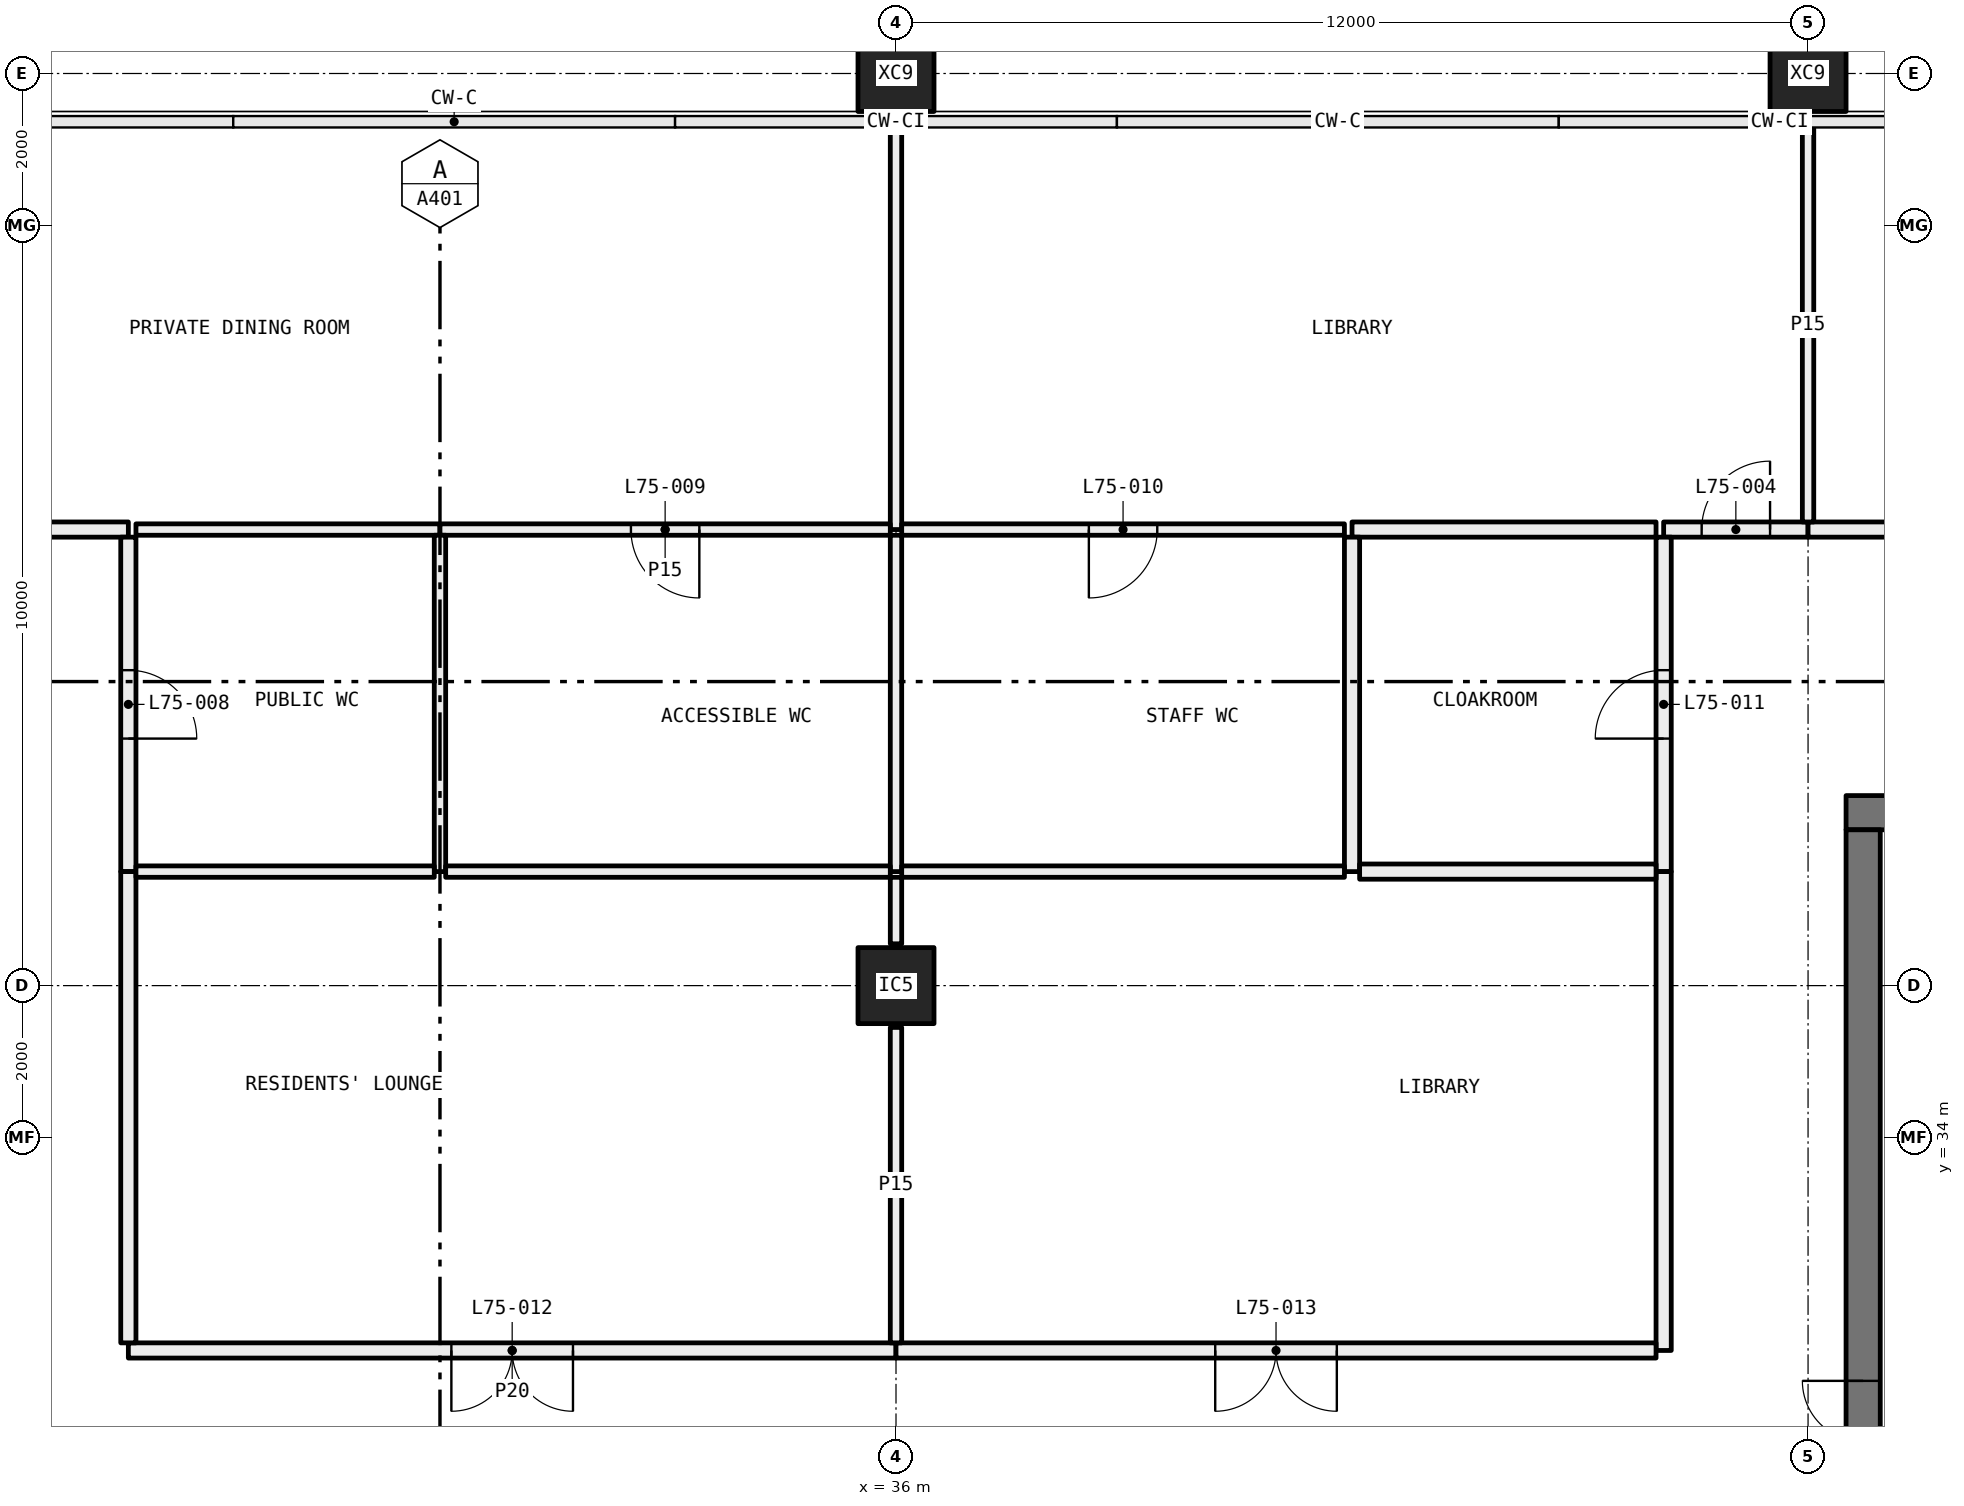
"""IFC4 building model, lengths in metres.
Left out: names, types, materials, properties, quantities, classifications, styles, units other than length and angle.
Written with IfcOpenShell. Run it as: python <this file> out.ifc"""

import sys

from ifc_helpers import new_model, si_unit, direction, frame, frame_2d, origin, origin_2d, place, context, subcontext, project, spatial, rectangle, hollow_rectangle, extrude, element, fill, save


model = new_model("IFC4")
c1 = context("Model", 3, precision=1e-05, world=origin(), true_north=direction((0.0, 1.0)))
c2 = subcontext(c1, "Body", "Model", "MODEL_VIEW")
j1 = project(units=[si_unit("LENGTHUNIT", "METRE"), si_unit("PLANEANGLEUNIT", "RADIAN")], contexts=[c1])
p1 = place(None, origin())
s1 = spatial("IfcSite", under=j1, at=p1, CompositionType="ELEMENT")
p2 = place(p1, origin())
s2 = spatial("IfcBuilding", under=s1, at=p2, CompositionType="ELEMENT")
p3 = place(p2, frame((0.0, 0.0, 277.95)))
s3 = spatial("IfcBuildingStorey", under=s2, at=p3, CompositionType="ELEMENT", Elevation=277.95)
p4 = place(p3, frame((36.0, 36.0, 0.0), z_axis=(0.0, 0.0, 1.0), x_axis=(1.0, 0.0, 0.0)))
e1 = element("IfcColumn", 1, at=p4, inside=s3, PredefinedType="COLUMN", context=c2, shape_type="SweptSolid", body=[
    extrude(hollow_rectangle(XDim=1.0, YDim=1.0, WallThickness=0.04, at=origin_2d()), origin(), (0.0, 0.0, 1.0), 5.0),
])
for number, where, z_axis, x_axis in (
    (2, (36.0, 48.0, -0.4), (0.0, 0.0, 1.0), (1.0, 0.0, 0.0)),
    (3, (48.0, 48.0, -0.4), (0.0, 0.0, 1.0), (1.0, 0.0, 0.0)),
):
    element("IfcColumn", number, at=place(p3, frame(where, z_axis=z_axis, x_axis=x_axis)), inside=s3, PredefinedType="COLUMN", context=c2, shape_type="SweptSolid", body=[
        extrude(hollow_rectangle(XDim=1.0, YDim=1.0, WallThickness=0.036, at=origin_2d()), origin(), (0.0, 0.0, 1.0), 5.4),
    ])
p5 = place(p3, frame((25.9, 42.0, 0.0), z_axis=(0.0, 0.0, 1.0), x_axis=(-1.0, 0.0, 0.0)))
e4 = element("IfcWall", 4, at=p5, inside=s3, PredefinedType="PARTITIONING", context=c2, shape_type="SweptSolid", body=[
    extrude(rectangle(XDim=7.18, YDim=0.2, at=frame_2d((3.59, 0.0))), origin(), (0.0, 0.0, 1.0), 5.0),
])
p6 = place(p5, frame((2.79, 0.0, 0.0)))
e5 = element("IfcOpeningElement", 5, at=p6, cuts=e4, PredefinedType="OPENING", context=c2, shape_type="SweptSolid", body=[
    extrude(rectangle(XDim=1.6, YDim=2.1, at=frame_2d((0.8, 1.05))), frame((0.0, 0.11, 0.0), z_axis=(0.0, -1.0, 0.0), x_axis=(1.0, 0.0, 0.0)), (0.0, 0.0, 1.0), 0.22),
])
p7 = place(p3, frame((48.0, 42.0, 0.0), z_axis=(0.0, 0.0, 1.0), x_axis=(-1.0, 0.0, 0.0)))
e6 = element("IfcWall", 6, at=p7, inside=s3, PredefinedType="PARTITIONING", context=c2, shape_type="SweptSolid", body=[
    extrude(rectangle(XDim=1.9, YDim=0.2, at=frame_2d((0.95, 0.0))), origin(), (0.0, 0.0, 1.0), 5.0),
])
p8 = place(p7, frame((0.5, 0.0, 0.0)))
e7 = element("IfcOpeningElement", 7, at=p8, cuts=e6, PredefinedType="OPENING", context=c2, shape_type="SweptSolid", body=[
    extrude(rectangle(XDim=0.9, YDim=2.1, at=frame_2d((0.45, 1.05))), frame((0.0, 0.11, 0.0), z_axis=(0.0, -1.0, 0.0), x_axis=(1.0, 0.0, 0.0)), (0.0, 0.0, 1.0), 0.22),
])
p9 = place(p3, frame((53.28, 42.0, 0.0), z_axis=(0.0, 0.0, 1.0), x_axis=(-1.0, 0.0, 0.0)))
e8 = element("IfcWall", 8, at=p9, inside=s3, PredefinedType="PARTITIONING", context=c2, shape_type="SweptSolid", body=[
    extrude(rectangle(XDim=5.28, YDim=0.2, at=frame_2d((2.64, 0.0))), origin(), (0.0, 0.0, 1.0), 5.0),
])
p10 = place(p9, frame((2.19, 0.0, 0.0)))
e9 = element("IfcOpeningElement", 9, at=p10, cuts=e8, PredefinedType="OPENING", context=c2, shape_type="SweptSolid", body=[
    extrude(rectangle(XDim=0.9, YDim=2.1, at=frame_2d((0.45, 1.05))), frame((0.0, 0.11, 0.0), z_axis=(0.0, -1.0, 0.0), x_axis=(1.0, 0.0, 0.0)), (0.0, 0.0, 1.0), 0.22),
])
p11 = place(p3, frame((25.9, 37.5, 0.0), z_axis=(0.0, 0.0, 1.0), x_axis=(0.0, 1.0, 0.0)))
e10 = element("IfcWall", 10, at=p11, inside=s3, PredefinedType="PARTITIONING", context=c2, shape_type="SweptSolid", body=[
    extrude(rectangle(XDim=4.4, YDim=0.2, at=frame_2d((2.2, 0.0))), origin(), (0.0, 0.0, 1.0), 5.0),
])
p12 = place(p11, frame((1.75, 0.0, 0.0)))
e11 = element("IfcOpeningElement", 11, at=p12, cuts=e10, PredefinedType="OPENING", context=c2, shape_type="SweptSolid", body=[
    extrude(rectangle(XDim=0.9, YDim=2.1, at=frame_2d((0.45, 1.05))), frame((0.0, 0.11, 0.0), z_axis=(0.0, -1.0, 0.0), x_axis=(1.0, 0.0, 0.0)), (0.0, 0.0, 1.0), 0.22),
])
p13 = place(p3, frame((46.1, 41.9, 0.0), z_axis=(0.0, 0.0, 1.0), x_axis=(0.0, -1.0, 0.0)))
e12 = element("IfcWall", 12, at=p13, inside=s3, PredefinedType="PARTITIONING", context=c2, shape_type="SweptSolid", body=[
    extrude(rectangle(XDim=4.4, YDim=0.2, at=frame_2d((2.2, 0.0))), origin(), (0.0, 0.0, 1.0), 5.0),
])
p14 = place(p13, frame((1.75, 0.0, 0.0)))
e13 = element("IfcOpeningElement", 13, at=p14, cuts=e12, PredefinedType="OPENING", context=c2, shape_type="SweptSolid", body=[
    extrude(rectangle(XDim=0.9, YDim=2.1, at=frame_2d((0.45, 1.05))), frame((0.0, 0.11, 0.0), z_axis=(0.0, -1.0, 0.0), x_axis=(1.0, 0.0, 0.0)), (0.0, 0.0, 1.0), 0.22),
])
p15 = place(p3, frame((36.0, 31.2, 0.0), z_axis=(0.0, 0.0, 1.0), x_axis=(-1.0, 0.0, 0.0)))
e14 = element("IfcWall", 14, at=p15, inside=s3, PredefinedType="PARTITIONING", context=c2, shape_type="SweptSolid", body=[
    extrude(rectangle(XDim=10.1, YDim=0.2, at=frame_2d((5.05, 0.0))), origin(), (0.0, 0.0, 1.0), 4.4),
])
p16 = place(p15, frame((4.25, 0.0, 0.0)))
e15 = element("IfcOpeningElement", 15, at=p16, cuts=e14, PredefinedType="OPENING", context=c2, shape_type="SweptSolid", body=[
    extrude(rectangle(XDim=1.6, YDim=2.1, at=frame_2d((0.8, 1.05))), frame((0.0, 0.11, 0.0), z_axis=(0.0, -1.0, 0.0), x_axis=(1.0, 0.0, 0.0)), (0.0, 0.0, 1.0), 0.22),
])
p17 = place(p3, frame((25.9, 31.3, 0.0), z_axis=(0.0, 0.0, 1.0), x_axis=(0.0, 1.0, 0.0)))
e16 = element("IfcWall", 16, at=p17, inside=s3, PredefinedType="PARTITIONING", context=c2, shape_type="SweptSolid", body=[
    extrude(rectangle(XDim=6.2, YDim=0.2, at=frame_2d((3.1, 0.0))), origin(), (0.0, 0.0, 1.0), 5.0),
])
p18 = place(p3, frame((46.1, 37.5, 0.0), z_axis=(0.0, 0.0, 1.0), x_axis=(0.0, -1.0, 0.0)))
e17 = element("IfcWall", 17, at=p18, inside=s3, PredefinedType="PARTITIONING", context=c2, shape_type="SweptSolid", body=[
    extrude(rectangle(XDim=6.3, YDim=0.2, at=frame_2d((3.15, 0.0))), origin(), (0.0, 0.0, 1.0), 5.0),
])
p19 = place(p3, frame((46.0, 31.2, 0.0), z_axis=(0.0, 0.0, 1.0), x_axis=(-1.0, 0.0, 0.0)))
e18 = element("IfcWall", 18, at=p19, inside=s3, PredefinedType="PARTITIONING", context=c2, shape_type="SweptSolid", body=[
    extrude(rectangle(XDim=10.0, YDim=0.2, at=frame_2d((5.0, 0.0))), origin(), (0.0, 0.0, 1.0), 4.4),
])
p20 = place(p19, frame((4.2, 0.0, 0.0)))
e19 = element("IfcOpeningElement", 19, at=p20, cuts=e18, PredefinedType="OPENING", context=c2, shape_type="SweptSolid", body=[
    extrude(rectangle(XDim=1.6, YDim=2.1, at=frame_2d((0.8, 1.05))), frame((0.0, 0.11, 0.0), z_axis=(0.0, -1.0, 0.0), x_axis=(1.0, 0.0, 0.0)), (0.0, 0.0, 1.0), 0.22),
])
p21 = place(p3, frame((36.0, 42.0, 0.0), z_axis=(0.0, 0.0, 1.0), x_axis=(0.0, 1.0, 0.0)))
e20 = element("IfcWall", 20, at=p21, inside=s3, PredefinedType="PARTITIONING", context=c2, shape_type="SweptSolid", body=[
    extrude(rectangle(XDim=5.28, YDim=0.15, at=frame_2d((2.64, 0.0))), origin(), (0.0, 0.0, 1.0), 4.1),
])
p22 = place(p3, frame((26.0, 42.0, 0.0), z_axis=(0.0, 0.0, 1.0), x_axis=(1.0, 0.0, 0.0)))
e21 = element("IfcWall", 21, at=p22, inside=s3, PredefinedType="PARTITIONING", context=c2, shape_type="SweptSolid", body=[
    extrude(rectangle(XDim=4.0, YDim=0.15, at=frame_2d((2.0, 0.0))), origin(), (0.0, 0.0, 1.0), 5.0),
])
p23 = place(p3, frame((30.0, 42.0, 0.0), z_axis=(0.0, 0.0, 1.0), x_axis=(1.0, 0.0, 0.0)))
e22 = element("IfcWall", 22, at=p23, inside=s3, PredefinedType="PARTITIONING", context=c2, shape_type="SweptSolid", body=[
    extrude(rectangle(XDim=5.925, YDim=0.15, at=frame_2d((2.962, 0.0))), origin(), (0.0, 0.0, 1.0), 5.0),
])
p24 = place(p23, frame((2.512, 0.0, 0.0)))
e23 = element("IfcOpeningElement", 23, at=p24, cuts=e22, PredefinedType="OPENING", context=c2, shape_type="SweptSolid", body=[
    extrude(rectangle(XDim=0.9, YDim=2.1, at=frame_2d((0.45, 1.05))), frame((0.0, 0.085, 0.0), z_axis=(0.0, -1.0, 0.0), x_axis=(1.0, 0.0, 0.0)), (0.0, 0.0, 1.0), 0.17),
])
p25 = place(p3, frame((48.0, 42.1, 0.0), z_axis=(0.0, 0.0, 1.0), x_axis=(0.0, 1.0, 0.0)))
e24 = element("IfcWall", 24, at=p25, inside=s3, PredefinedType="PARTITIONING", context=c2, shape_type="SweptSolid", body=[
    extrude(rectangle(XDim=5.18, YDim=0.15, at=frame_2d((2.59, 0.0))), origin(), (0.0, 0.0, 1.0), 5.0),
])
p26 = place(p3, frame((36.075, 42.0, 0.0), z_axis=(0.0, 0.0, 1.0), x_axis=(1.0, 0.0, 0.0)))
e25 = element("IfcWall", 25, at=p26, inside=s3, PredefinedType="PARTITIONING", context=c2, shape_type="SweptSolid", body=[
    extrude(rectangle(XDim=5.825, YDim=0.15, at=frame_2d((2.913, 0.0))), origin(), (0.0, 0.0, 1.0), 5.0),
])
p27 = place(p26, frame((2.462, 0.0, 0.0)))
e26 = element("IfcOpeningElement", 26, at=p27, cuts=e25, PredefinedType="OPENING", context=c2, shape_type="SweptSolid", body=[
    extrude(rectangle(XDim=0.9, YDim=2.1, at=frame_2d((0.45, 1.05))), frame((0.0, 0.085, 0.0), z_axis=(0.0, -1.0, 0.0), x_axis=(1.0, 0.0, 0.0)), (0.0, 0.0, 1.0), 0.17),
])
p28 = place(p3, frame((42.0, 42.0, 0.0), z_axis=(0.0, 0.0, 1.0), x_axis=(1.0, 0.0, 0.0)))
e27 = element("IfcWall", 27, at=p28, inside=s3, PredefinedType="PARTITIONING", context=c2, shape_type="SweptSolid", body=[
    extrude(rectangle(XDim=4.0, YDim=0.2, at=frame_2d((2.0, 0.0))), origin(), (0.0, 0.0, 1.0), 5.0),
])
p29 = place(p3, frame((30.0, 37.5, 0.0), z_axis=(0.0, 0.0, 1.0), x_axis=(0.0, 1.0, 0.0)))
e28 = element("IfcWall", 28, at=p29, inside=s3, PredefinedType="PARTITIONING", context=c2, shape_type="SweptSolid", body=[
    extrude(rectangle(XDim=4.425, YDim=0.15, at=frame_2d((2.212, 0.0))), origin(), (0.0, 0.0, 1.0), 5.0),
])
p30 = place(p3, frame((26.0, 37.5, 0.0), z_axis=(0.0, 0.0, 1.0), x_axis=(1.0, 0.0, 0.0)))
e29 = element("IfcWall", 29, at=p30, inside=s3, PredefinedType="PARTITIONING", context=c2, shape_type="SweptSolid", body=[
    extrude(rectangle(XDim=3.925, YDim=0.15, at=frame_2d((1.962, 0.0))), origin(), (0.0, 0.0, 1.0), 5.0),
])
p31 = place(p3, frame((36.0, 37.5, 0.0), z_axis=(0.0, 0.0, 1.0), x_axis=(0.0, 1.0, 0.0)))
e30 = element("IfcWall", 30, at=p31, inside=s3, PredefinedType="PARTITIONING", context=c2, shape_type="SweptSolid", body=[
    extrude(rectangle(XDim=4.425, YDim=0.15, at=frame_2d((2.212, 0.0))), origin(), (0.0, 0.0, 1.0), 4.1),
])
p32 = place(p3, frame((30.075, 37.5, 0.0), z_axis=(0.0, 0.0, 1.0), x_axis=(1.0, 0.0, 0.0)))
e31 = element("IfcWall", 31, at=p32, inside=s3, PredefinedType="PARTITIONING", context=c2, shape_type="SweptSolid", body=[
    extrude(rectangle(XDim=5.85, YDim=0.15, at=frame_2d((2.925, 0.0))), origin(), (0.0, 0.0, 1.0), 5.0),
])
p33 = place(p3, frame((42.0, 37.5, 0.0), z_axis=(0.0, 0.0, 1.0), x_axis=(0.0, 1.0, 0.0)))
e32 = element("IfcWall", 32, at=p33, inside=s3, PredefinedType="PARTITIONING", context=c2, shape_type="SweptSolid", body=[
    extrude(rectangle(XDim=4.4, YDim=0.2, at=frame_2d((2.2, 0.0))), origin(), (0.0, 0.0, 1.0), 5.0),
])
p34 = place(p3, frame((36.075, 37.5, 0.0), z_axis=(0.0, 0.0, 1.0), x_axis=(1.0, 0.0, 0.0)))
e33 = element("IfcWall", 33, at=p34, inside=s3, PredefinedType="PARTITIONING", context=c2, shape_type="SweptSolid", body=[
    extrude(rectangle(XDim=5.825, YDim=0.15, at=frame_2d((2.913, 0.0))), origin(), (0.0, 0.0, 1.0), 5.0),
])
p35 = place(p3, frame((42.1, 37.5, 0.0), z_axis=(0.0, 0.0, 1.0), x_axis=(1.0, 0.0, 0.0)))
e34 = element("IfcWall", 34, at=p35, inside=s3, PredefinedType="PARTITIONING", context=c2, shape_type="SweptSolid", body=[
    extrude(rectangle(XDim=3.9, YDim=0.2, at=frame_2d((1.95, 0.0))), origin(), (0.0, 0.0, 1.0), 5.0),
])
p36 = place(p3, frame((36.0, 31.3, 0.0), z_axis=(0.0, 0.0, 1.0), x_axis=(0.0, 1.0, 0.0)))
e35 = element("IfcWall", 35, at=p36, inside=s3, PredefinedType="PARTITIONING", context=c2, shape_type="SweptSolid", body=[
    extrude(rectangle(XDim=4.15, YDim=0.15, at=frame_2d((2.075, 0.0))), origin(), (0.0, 0.0, 1.0), 4.4),
])
p37 = place(p3, frame((36.0, 36.55, 0.0), z_axis=(0.0, 0.0, 1.0), x_axis=(0.0, 1.0, 0.0)))
e36 = element("IfcWall", 36, at=p37, inside=s3, PredefinedType="PARTITIONING", context=c2, shape_type="SweptSolid", body=[
    extrude(rectangle(XDim=0.875, YDim=0.15, at=frame_2d((0.438, 0.0))), origin(), (0.0, 0.0, 1.0), 4.1),
])
p38 = place(p3, frame((59.5, 38.275, 0.0), z_axis=(0.0, 0.0, 1.0), x_axis=(-1.0, 0.0, 0.0)))
e37 = element("IfcWall", 37, at=p38, inside=s3, PredefinedType="SHEAR", context=c2, shape_type="SweptSolid", body=[
    extrude(rectangle(XDim=11.0, YDim=0.45, at=frame_2d((5.5, 0.0))), origin(), (0.0, 0.0, 1.0), 5.0),
])
p39 = place(p38, frame((8.575, 0.0, 0.0)))
e38 = element("IfcOpeningElement", 38, at=p39, cuts=e37, PredefinedType="OPENING", context=c2, shape_type="SweptSolid", body=[
    extrude(rectangle(XDim=1.6, YDim=2.1, at=frame_2d((0.8, 1.05))), frame((0.0, 0.235, 0.0), z_axis=(0.0, -1.0, 0.0), x_axis=(1.0, 0.0, 0.0)), (0.0, 0.0, 1.0), 0.47),
])
p40 = place(p3, frame((48.725, 21.95, 0.0), z_axis=(0.0, 0.0, 1.0), x_axis=(0.0, 1.0, 0.0)))
e39 = element("IfcWall", 39, at=p40, inside=s3, PredefinedType="SHEAR", context=c2, shape_type="SweptSolid", body=[
    extrude(rectangle(XDim=16.1, YDim=0.45, at=frame_2d((8.05, 0.0))), origin(), (0.0, 0.0, 1.0), 5.0),
])
p41 = place(p40, frame((7.25, 0.0, 0.0)))
e40 = element("IfcOpeningElement", 40, at=p41, cuts=e39, PredefinedType="OPENING", context=c2, shape_type="SweptSolid", body=[
    extrude(rectangle(XDim=1.6, YDim=2.1, at=frame_2d((0.8, 1.05))), frame((0.0, 0.235, 0.0), z_axis=(0.0, -1.0, 0.0), x_axis=(1.0, 0.0, 0.0)), (0.0, 0.0, 1.0), 0.47),
])
p42 = place(p8, frame((0.9, 0.0, 0.0), x_axis=(-1.0, 0.0, 0.0)))
e41 = element("IfcDoor", 41, at=p42, inside=s3, OperationType="SINGLE_SWING_LEFT", PredefinedType="DOOR", context=c2, shape_type="SweptSolid", body=[
    extrude(rectangle(XDim=0.9, YDim=2.1, at=frame_2d((0.45, 1.05))), frame((0.0, 0.025, 0.0), z_axis=(0.0, -1.0, 0.0), x_axis=(1.0, 0.0, 0.0)), (0.0, 0.0, 1.0), 0.05),
])
fill(e7, e41)
p43 = place(p12, frame((0.9, 0.0, 0.0), x_axis=(-1.0, 0.0, 0.0)))
e42 = element("IfcDoor", 42, at=p43, inside=s3, OperationType="SINGLE_SWING_LEFT", PredefinedType="DOOR", context=c2, shape_type="SweptSolid", body=[
    extrude(rectangle(XDim=0.9, YDim=2.1, at=frame_2d((0.45, 1.05))), frame((0.0, 0.025, 0.0), z_axis=(0.0, -1.0, 0.0), x_axis=(1.0, 0.0, 0.0)), (0.0, 0.0, 1.0), 0.05),
])
fill(e11, e42)
p44 = place(p24, frame((0.9, 0.0, 0.0), x_axis=(-1.0, 0.0, 0.0)))
e43 = element("IfcDoor", 43, at=p44, inside=s3, OperationType="SINGLE_SWING_RIGHT", PredefinedType="DOOR", context=c2, shape_type="SweptSolid", body=[
    extrude(rectangle(XDim=0.9, YDim=2.1, at=frame_2d((0.45, 1.05))), frame((0.0, 0.025, 0.0), z_axis=(0.0, -1.0, 0.0), x_axis=(1.0, 0.0, 0.0)), (0.0, 0.0, 1.0), 0.05),
])
fill(e23, e43)
p45 = place(p27, frame((0.9, 0.0, 0.0), x_axis=(-1.0, 0.0, 0.0)))
e44 = element("IfcDoor", 44, at=p45, inside=s3, OperationType="SINGLE_SWING_LEFT", PredefinedType="DOOR", context=c2, shape_type="SweptSolid", body=[
    extrude(rectangle(XDim=0.9, YDim=2.1, at=frame_2d((0.45, 1.05))), frame((0.0, 0.025, 0.0), z_axis=(0.0, -1.0, 0.0), x_axis=(1.0, 0.0, 0.0)), (0.0, 0.0, 1.0), 0.05),
])
fill(e26, e44)
p46 = place(p14, frame((0.9, 0.0, 0.0), x_axis=(-1.0, 0.0, 0.0)))
e45 = element("IfcDoor", 45, at=p46, inside=s3, OperationType="SINGLE_SWING_RIGHT", PredefinedType="DOOR", context=c2, shape_type="SweptSolid", body=[
    extrude(rectangle(XDim=0.9, YDim=2.1, at=frame_2d((0.45, 1.05))), frame((0.0, 0.025, 0.0), z_axis=(0.0, -1.0, 0.0), x_axis=(1.0, 0.0, 0.0)), (0.0, 0.0, 1.0), 0.05),
])
fill(e13, e45)
p47 = place(p16, origin())
e46 = element("IfcDoor", 46, at=p47, inside=s3, OperationType="DOUBLE_DOOR_SINGLE_SWING", PredefinedType="DOOR", context=c2, shape_type="SweptSolid", body=[
    extrude(rectangle(XDim=1.6, YDim=2.1, at=frame_2d((0.8, 1.05))), frame((0.0, 0.025, 0.0), z_axis=(0.0, -1.0, 0.0), x_axis=(1.0, 0.0, 0.0)), (0.0, 0.0, 1.0), 0.05),
])
fill(e15, e46)
p48 = place(p20, origin())
e47 = element("IfcDoor", 47, at=p48, inside=s3, OperationType="DOUBLE_DOOR_SINGLE_SWING", PredefinedType="DOOR", context=c2, shape_type="SweptSolid", body=[
    extrude(rectangle(XDim=1.6, YDim=2.1, at=frame_2d((0.8, 1.05))), frame((0.0, 0.025, 0.0), z_axis=(0.0, -1.0, 0.0), x_axis=(1.0, 0.0, 0.0)), (0.0, 0.0, 1.0), 0.05),
])
fill(e19, e47)
p49 = place(p41, origin())
e48 = element("IfcDoor", 48, at=p49, inside=s3, OperationType="DOUBLE_DOOR_SINGLE_SWING", PredefinedType="DOOR", context=c2, shape_type="SweptSolid", body=[
    extrude(rectangle(XDim=1.6, YDim=2.1, at=frame_2d((0.8, 1.05))), frame((0.0, 0.025, 0.0), z_axis=(0.0, -1.0, 0.0), x_axis=(1.0, 0.0, 0.0)), (0.0, 0.0, 1.0), 0.05),
])
fill(e40, e48)
save(model, sys.argv[1])
